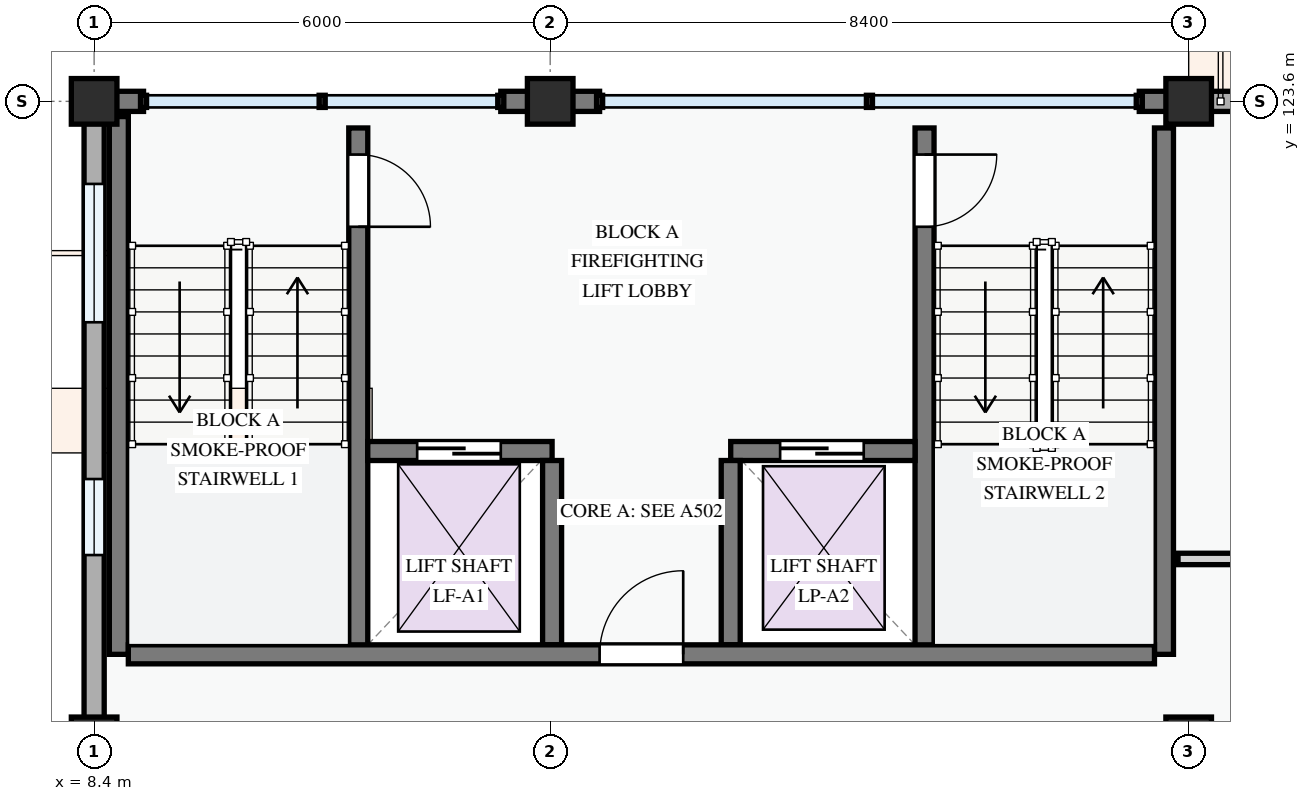
"""IFC4 building model, lengths in metres.
Left out: names, types, materials, properties, quantities, classifications, styles, units other than length and angle.
Written with IfcOpenShell. Run it as: python <this file> out.ifc"""

import sys

from ifc_helpers import new_model, si_unit, direction, frame, frame_2d, origin, origin_2d, place, context, subcontext, project, spatial, rectangle, extrude, element, fill, save


model = new_model("IFC4")
c1 = context("Model", 3, precision=1e-05, world=origin(), true_north=direction((0.0, 1.0)))
c2 = subcontext(c1, "Body", "Model", "MODEL_VIEW")
j1 = project(units=[si_unit("LENGTHUNIT", "METRE"), si_unit("PLANEANGLEUNIT", "RADIAN")], contexts=[c1])
p1 = place(None, origin())
s1 = spatial("IfcSite", under=j1, at=p1, CompositionType="ELEMENT")
p2 = place(p1, origin())
s2 = spatial("IfcBuilding", under=s1, at=p2, CompositionType="ELEMENT")
p3 = place(p2, frame((0.0, 0.0, 34.5)))
s3 = spatial("IfcBuildingStorey", under=s2, at=p3, CompositionType="ELEMENT", Elevation=34.5)
for number, where, z_axis, x_axis in (
    (1, (8.4, 115.2, 0.0), (0.0, 0.0, 1.0), (1.0, 0.0, 0.0)),
    (2, (8.4, 123.6, 0.0), (0.0, 0.0, 1.0), (1.0, 0.0, 0.0)),
    (3, (14.4, 123.6, 0.0), (0.0, 0.0, 1.0), (1.0, 0.0, 0.0)),
    (4, (22.8, 115.2, 0.0), (0.0, 0.0, 1.0), (1.0, 0.0, 0.0)),
    (5, (22.8, 123.6, 0.0), (0.0, 0.0, 1.0), (1.0, 0.0, 0.0)),
):
    element("IfcColumn", number, at=place(p3, frame(where, z_axis=z_axis, x_axis=x_axis)), inside=s3, PredefinedType="COLUMN", context=c2, shape_type="SweptSolid", body=[
        extrude(rectangle(XDim=0.6, YDim=0.6, at=origin_2d()), origin(), (0.0, 0.0, 1.0), 3.3),
    ])
p4 = place(p3, frame((28.8, 123.6, 0.0), z_axis=(0.0, 0.0, 1.0), x_axis=(-1.0, 0.0, 0.0)))
e6 = element("IfcWall", 6, at=p4, inside=s3, PredefinedType="STANDARD", context=c2, shape_type="SweptSolid", body=[
    extrude(rectangle(XDim=6.0, YDim=0.265, at=frame_2d((3.0, 0.0))), origin(), (0.0, 0.0, 1.0), 2.445),
])
p5 = place(p4, frame((0.62, 0.0, 0.0)))
e7 = element("IfcOpeningElement", 7, at=p5, cuts=e6, PredefinedType="OPENING", context=c2, shape_type="SweptSolid", body=[
    extrude(rectangle(XDim=1.4, YDim=2.2, at=frame_2d((0.7, 1.1))), frame((0.0, 0.143, 0.0), z_axis=(0.0, -1.0, 0.0), x_axis=(1.0, 0.0, 0.0)), (0.0, 0.0, 1.0), 0.285),
])
p6 = place(p4, frame((3.315, 0.0, 0.78)))
e8 = element("IfcOpeningElement", 8, at=p6, cuts=e6, PredefinedType="OPENING", context=c2, shape_type="SweptSolid", body=[
    extrude(rectangle(XDim=1.25, YDim=1.45, at=frame_2d((0.625, 0.725))), frame((0.0, 0.143, 0.0), z_axis=(0.0, -1.0, 0.0), x_axis=(1.0, 0.0, 0.0)), (0.0, 0.0, 1.0), 0.285),
])
for number, where, z_axis, x_axis in (
    (9, (22.8, 123.6, 0.0), (0.0, 0.0, 1.0), (-1.0, 0.0, 0.0)),
    (10, (15.05, 123.6, 0.0), (0.0, 0.0, 1.0), (-1.0, 0.0, 0.0)),
):
    element("IfcWall", number, at=place(p3, frame(where, z_axis=z_axis, x_axis=x_axis)), inside=s3, PredefinedType="STANDARD", context=c2, shape_type="SweptSolid", body=[
        extrude(rectangle(XDim=0.65, YDim=0.265, at=frame_2d((0.325, 0.0))), origin(), (0.0, 0.0, 1.0), 3.04),
    ])
p7 = place(p3, frame((14.4, 123.6, 0.0), z_axis=(0.0, 0.0, 1.0), x_axis=(-1.0, 0.0, 0.0)))
e11 = element("IfcWall", 11, at=p7, inside=s3, PredefinedType="STANDARD", context=c2, shape_type="SweptSolid", body=[
    extrude(rectangle(XDim=0.65, YDim=0.265, at=frame_2d((0.325, 0.0))), origin(), (0.0, 0.0, 1.0), 3.04),
])
p8 = place(p3, frame((9.05, 123.6, 0.0), z_axis=(0.0, 0.0, 1.0), x_axis=(-1.0, 0.0, 0.0)))
e12 = element("IfcWall", 12, at=p8, inside=s3, PredefinedType="STANDARD", context=c2, shape_type="SweptSolid", body=[
    extrude(rectangle(XDim=0.516, YDim=0.265, at=frame_2d((0.258, 0.0))), origin(), (0.0, 0.0, 1.0), 3.04),
])
p9 = place(p3, frame((8.4, 123.6, 0.0), z_axis=(0.0, 0.0, 1.0), x_axis=(0.0, -1.0, 0.0)))
e13 = element("IfcWall", 13, at=p9, inside=s3, PredefinedType="STANDARD", context=c2, shape_type="SweptSolid", body=[
    extrude(rectangle(XDim=8.4, YDim=0.265, at=frame_2d((4.2, 0.0))), origin(), (0.0, 0.0, 1.0), 2.345),
])
p10 = place(p9, frame((1.086, 0.0, 0.78)))
e14 = element("IfcOpeningElement", 14, at=p10, cuts=e13, PredefinedType="OPENING", context=c2, shape_type="SweptSolid", body=[
    extrude(rectangle(XDim=1.82, YDim=1.46, at=frame_2d((0.91, 0.73))), frame((0.0, 0.143, 0.0), z_axis=(0.0, -1.0, 0.0), x_axis=(1.0, 0.0, 0.0)), (0.0, 0.0, 1.0), 0.285),
])
p11 = place(p9, frame((4.969, 0.0, 0.78)))
e15 = element("IfcOpeningElement", 15, at=p11, cuts=e13, PredefinedType="OPENING", context=c2, shape_type="SweptSolid", body=[
    extrude(rectangle(XDim=1.0, YDim=1.25, at=frame_2d((0.5, 0.625))), frame((0.0, 0.143, 0.0), z_axis=(0.0, -1.0, 0.0), x_axis=(1.0, 0.0, 0.0)), (0.0, 0.0, 1.0), 0.285),
])
p12 = place(p3, frame((11.875, 123.25, 0.0), z_axis=(0.0, 0.0, 1.0), x_axis=(0.0, -1.0, 0.0)))
e16 = element("IfcWall", 16, at=p12, inside=s3, PredefinedType="SHEAR", context=c2, shape_type="SweptSolid", body=[
    extrude(rectangle(XDim=6.925, YDim=0.25, at=frame_2d((3.462, 0.0))), origin(), (0.0, 0.0, 1.0), 3.0),
])
p13 = place(p12, frame((0.35, 0.0, 0.0)))
e17 = element("IfcOpeningElement", 17, at=p13, cuts=e16, PredefinedType="OPENING", context=c2, shape_type="SweptSolid", body=[
    extrude(rectangle(XDim=0.95, YDim=2.1, at=frame_2d((0.475, 1.05))), frame((0.0, 0.135, 0.0), z_axis=(0.0, -1.0, 0.0), x_axis=(1.0, 0.0, 0.0)), (0.0, 0.0, 1.0), 0.27),
])
p14 = place(p3, frame((8.725, 123.4, 0.0), z_axis=(0.0, 0.0, 1.0), x_axis=(0.0, -1.0, 0.0)))
e18 = element("IfcWall", 18, at=p14, inside=s3, PredefinedType="SHEAR", context=c2, shape_type="SweptSolid", body=[
    extrude(rectangle(XDim=7.075, YDim=0.25, at=frame_2d((3.538, 0.0))), origin(), (0.0, 0.0, 1.0), 3.0),
])
p15 = place(p3, frame((22.475, 123.25, 0.0), z_axis=(0.0, 0.0, 1.0), x_axis=(0.0, -1.0, 0.0)))
e19 = element("IfcWall", 19, at=p15, inside=s3, PredefinedType="SHEAR", context=c2, shape_type="SweptSolid", body=[
    extrude(rectangle(XDim=6.925, YDim=0.25, at=frame_2d((3.462, 0.0))), origin(), (0.0, 0.0, 1.0), 3.0),
])
p16 = place(p3, frame((19.325, 123.25, 0.0), z_axis=(0.0, 0.0, 1.0), x_axis=(0.0, -1.0, 0.0)))
e20 = element("IfcWall", 20, at=p16, inside=s3, PredefinedType="SHEAR", context=c2, shape_type="SweptSolid", body=[
    extrude(rectangle(XDim=6.925, YDim=0.25, at=frame_2d((3.462, 0.0))), origin(), (0.0, 0.0, 1.0), 3.0),
])
p17 = place(p16, frame((0.35, 0.0, 0.0)))
e21 = element("IfcOpeningElement", 21, at=p17, cuts=e20, PredefinedType="OPENING", context=c2, shape_type="SweptSolid", body=[
    extrude(rectangle(XDim=0.95, YDim=2.1, at=frame_2d((0.475, 1.05))), frame((0.0, 0.135, 0.0), z_axis=(0.0, -1.0, 0.0), x_axis=(1.0, 0.0, 0.0)), (0.0, 0.0, 1.0), 0.27),
])
p18 = place(p3, frame((12.0, 119.0, 0.0), z_axis=(0.0, 0.0, 1.0), x_axis=(1.0, 0.0, 0.0)))
e22 = element("IfcWall", 22, at=p18, inside=s3, PredefinedType="SHEAR", context=c2, shape_type="SweptSolid", body=[
    extrude(rectangle(XDim=2.425, YDim=0.25, at=frame_2d((1.212, 0.0))), origin(), (0.0, 0.0, 1.0), 3.0),
])
p19 = place(p18, frame((0.65, 0.0, 0.0)))
e23 = element("IfcOpeningElement", 23, at=p19, cuts=e22, PredefinedType="OPENING", context=c2, shape_type="SweptSolid", body=[
    extrude(rectangle(XDim=1.1, YDim=2.15, at=frame_2d((0.55, 1.075))), frame((0.0, 0.135, 0.0), z_axis=(0.0, -1.0, 0.0), x_axis=(1.0, 0.0, 0.0)), (0.0, 0.0, 1.0), 0.27),
])
p20 = place(p3, frame((16.775, 119.0, 0.0), z_axis=(0.0, 0.0, 1.0), x_axis=(1.0, 0.0, 0.0)))
e24 = element("IfcWall", 24, at=p20, inside=s3, PredefinedType="SHEAR", context=c2, shape_type="SweptSolid", body=[
    extrude(rectangle(XDim=2.425, YDim=0.25, at=frame_2d((1.212, 0.0))), origin(), (0.0, 0.0, 1.0), 3.0),
])
p21 = place(p20, frame((0.65, 0.0, 0.0)))
e25 = element("IfcOpeningElement", 25, at=p21, cuts=e24, PredefinedType="OPENING", context=c2, shape_type="SweptSolid", body=[
    extrude(rectangle(XDim=1.1, YDim=2.15, at=frame_2d((0.55, 1.075))), frame((0.0, 0.135, 0.0), z_axis=(0.0, -1.0, 0.0), x_axis=(1.0, 0.0, 0.0)), (0.0, 0.0, 1.0), 0.27),
])
for number, where, z_axis, x_axis in (
    (26, (14.425, 118.875, 0.0), (0.0, 0.0, 1.0), (0.0, -1.0, 0.0)),
    (27, (16.775, 118.875, 0.0), (0.0, 0.0, 1.0), (0.0, -1.0, 0.0)),
):
    element("IfcWall", number, at=place(p3, frame(where, z_axis=z_axis, x_axis=x_axis)), inside=s3, PredefinedType="SHEAR", context=c2, shape_type="SweptSolid", body=[
        extrude(rectangle(XDim=2.425, YDim=0.25, at=frame_2d((1.212, 0.0))), origin(), (0.0, 0.0, 1.0), 3.0),
    ])
p22 = place(p3, frame((8.85, 116.325, 0.0), z_axis=(0.0, 0.0, 1.0), x_axis=(1.0, 0.0, 0.0)))
e28 = element("IfcWall", 28, at=p22, inside=s3, PredefinedType="SHEAR", context=c2, shape_type="SweptSolid", body=[
    extrude(rectangle(XDim=13.5, YDim=0.25, at=frame_2d((6.75, 0.0))), origin(), (0.0, 0.0, 1.0), 3.0),
])
p23 = place(p22, frame((6.2, 0.0, 0.0)))
e29 = element("IfcOpeningElement", 29, at=p23, cuts=e28, PredefinedType="OPENING", context=c2, shape_type="SweptSolid", body=[
    extrude(rectangle(XDim=1.1, YDim=2.15, at=frame_2d((0.55, 1.075))), frame((0.0, 0.135, 0.0), z_axis=(0.0, -1.0, 0.0), x_axis=(1.0, 0.0, 0.0)), (0.0, 0.0, 1.0), 0.27),
])
p24 = place(p3, frame((22.66, 117.58, 0.0), z_axis=(0.0, 0.0, 1.0), x_axis=(1.0, 0.0, 0.0)))
e30 = element("IfcWall", 30, at=p24, inside=s3, PredefinedType="PARTITIONING", context=c2, shape_type="SweptSolid", body=[
    extrude(rectangle(XDim=28.806, YDim=0.15, at=frame_2d((14.403, 0.0))), origin(), (0.0, 0.0, 1.0), 3.0),
])
p25 = place(p24, frame((2.74, 0.0, 0.0)))
e31 = element("IfcOpeningElement", 31, at=p25, cuts=e30, PredefinedType="OPENING", context=c2, shape_type="SweptSolid", body=[
    extrude(rectangle(XDim=0.92, YDim=2.1, at=frame_2d((0.46, 1.05))), frame((0.0, 0.085, 0.0), z_axis=(0.0, -1.0, 0.0), x_axis=(1.0, 0.0, 0.0)), (0.0, 0.0, 1.0), 0.17),
])
p26 = place(p24, frame((11.71, 0.0, 0.0)))
e32 = element("IfcOpeningElement", 32, at=p26, cuts=e30, PredefinedType="OPENING", context=c2, shape_type="SweptSolid", body=[
    extrude(rectangle(XDim=0.96, YDim=2.12, at=frame_2d((0.48, 1.06))), frame((0.0, 0.085, 0.0), z_axis=(0.0, -1.0, 0.0), x_axis=(1.0, 0.0, 0.0)), (0.0, 0.0, 1.0), 0.17),
])
p27 = place(p24, frame((22.397, 0.0, 0.0)))
e33 = element("IfcOpeningElement", 33, at=p27, cuts=e30, PredefinedType="OPENING", context=c2, shape_type="SweptSolid", body=[
    extrude(rectangle(XDim=0.92, YDim=2.1, at=frame_2d((0.46, 1.05))), frame((0.0, 0.085, 0.0), z_axis=(0.0, -1.0, 0.0), x_axis=(1.0, 0.0, 0.0)), (0.0, 0.0, 1.0), 0.17),
])
p28 = place(p10, origin())
e34 = element("IfcWindow", 34, at=p28, inside=s3, PartitioningType="DOUBLE_PANEL_VERTICAL", PredefinedType="WINDOW", context=c2, shape_type="SweptSolid", body=[
    extrude(rectangle(XDim=1.82, YDim=1.46, at=frame_2d((0.91, 0.73))), frame((0.0, 0.03, 0.0), z_axis=(0.0, -1.0, 0.0), x_axis=(1.0, 0.0, 0.0)), (0.0, 0.0, 1.0), 0.06),
])
fill(e14, e34)
p29 = place(p11, origin())
e35 = element("IfcWindow", 35, at=p29, inside=s3, PartitioningType="SINGLE_PANEL", PredefinedType="WINDOW", context=c2, shape_type="SweptSolid", body=[
    extrude(rectangle(XDim=1.0, YDim=1.25, at=frame_2d((0.5, 0.625))), frame((0.0, 0.03, 0.0), z_axis=(0.0, -1.0, 0.0), x_axis=(1.0, 0.0, 0.0)), (0.0, 0.0, 1.0), 0.06),
])
fill(e15, e35)
p30 = place(p13, origin())
e36 = element("IfcDoor", 36, at=p30, inside=s3, OperationType="SINGLE_SWING_RIGHT", PredefinedType="DOOR", context=c2, shape_type="SweptSolid", body=[
    extrude(rectangle(XDim=0.95, YDim=2.1, at=frame_2d((0.475, 1.05))), frame((0.0, 0.025, 0.0), z_axis=(0.0, -1.0, 0.0), x_axis=(1.0, 0.0, 0.0)), (0.0, 0.0, 1.0), 0.05),
])
fill(e17, e36)
p31 = place(p17, origin())
e37 = element("IfcDoor", 37, at=p31, inside=s3, OperationType="SINGLE_SWING_LEFT", PredefinedType="DOOR", context=c2, shape_type="SweptSolid", body=[
    extrude(rectangle(XDim=0.95, YDim=2.1, at=frame_2d((0.475, 1.05))), frame((0.0, 0.025, 0.0), z_axis=(0.0, -1.0, 0.0), x_axis=(1.0, 0.0, 0.0)), (0.0, 0.0, 1.0), 0.05),
])
fill(e21, e37)
p32 = place(p19, origin())
e38 = element("IfcDoor", 38, at=p32, inside=s3, OperationType="SLIDING_TO_LEFT", PredefinedType="DOOR", context=c2, shape_type="SweptSolid", body=[
    extrude(rectangle(XDim=1.1, YDim=2.15, at=frame_2d((0.55, 1.075))), frame((0.0, 0.025, 0.0), z_axis=(0.0, -1.0, 0.0), x_axis=(1.0, 0.0, 0.0)), (0.0, 0.0, 1.0), 0.05),
])
fill(e23, e38)
p33 = place(p21, origin())
e39 = element("IfcDoor", 39, at=p33, inside=s3, OperationType="SLIDING_TO_LEFT", PredefinedType="DOOR", context=c2, shape_type="SweptSolid", body=[
    extrude(rectangle(XDim=1.1, YDim=2.15, at=frame_2d((0.55, 1.075))), frame((0.0, 0.025, 0.0), z_axis=(0.0, -1.0, 0.0), x_axis=(1.0, 0.0, 0.0)), (0.0, 0.0, 1.0), 0.05),
])
fill(e25, e39)
p34 = place(p23, origin())
e40 = element("IfcDoor", 40, at=p34, inside=s3, OperationType="SINGLE_SWING_RIGHT", PredefinedType="DOOR", context=c2, shape_type="SweptSolid", body=[
    extrude(rectangle(XDim=1.1, YDim=2.15, at=frame_2d((0.55, 1.075))), frame((0.0, 0.025, 0.0), z_axis=(0.0, -1.0, 0.0), x_axis=(1.0, 0.0, 0.0)), (0.0, 0.0, 1.0), 0.05),
])
fill(e29, e40)
save(model, sys.argv[1])
